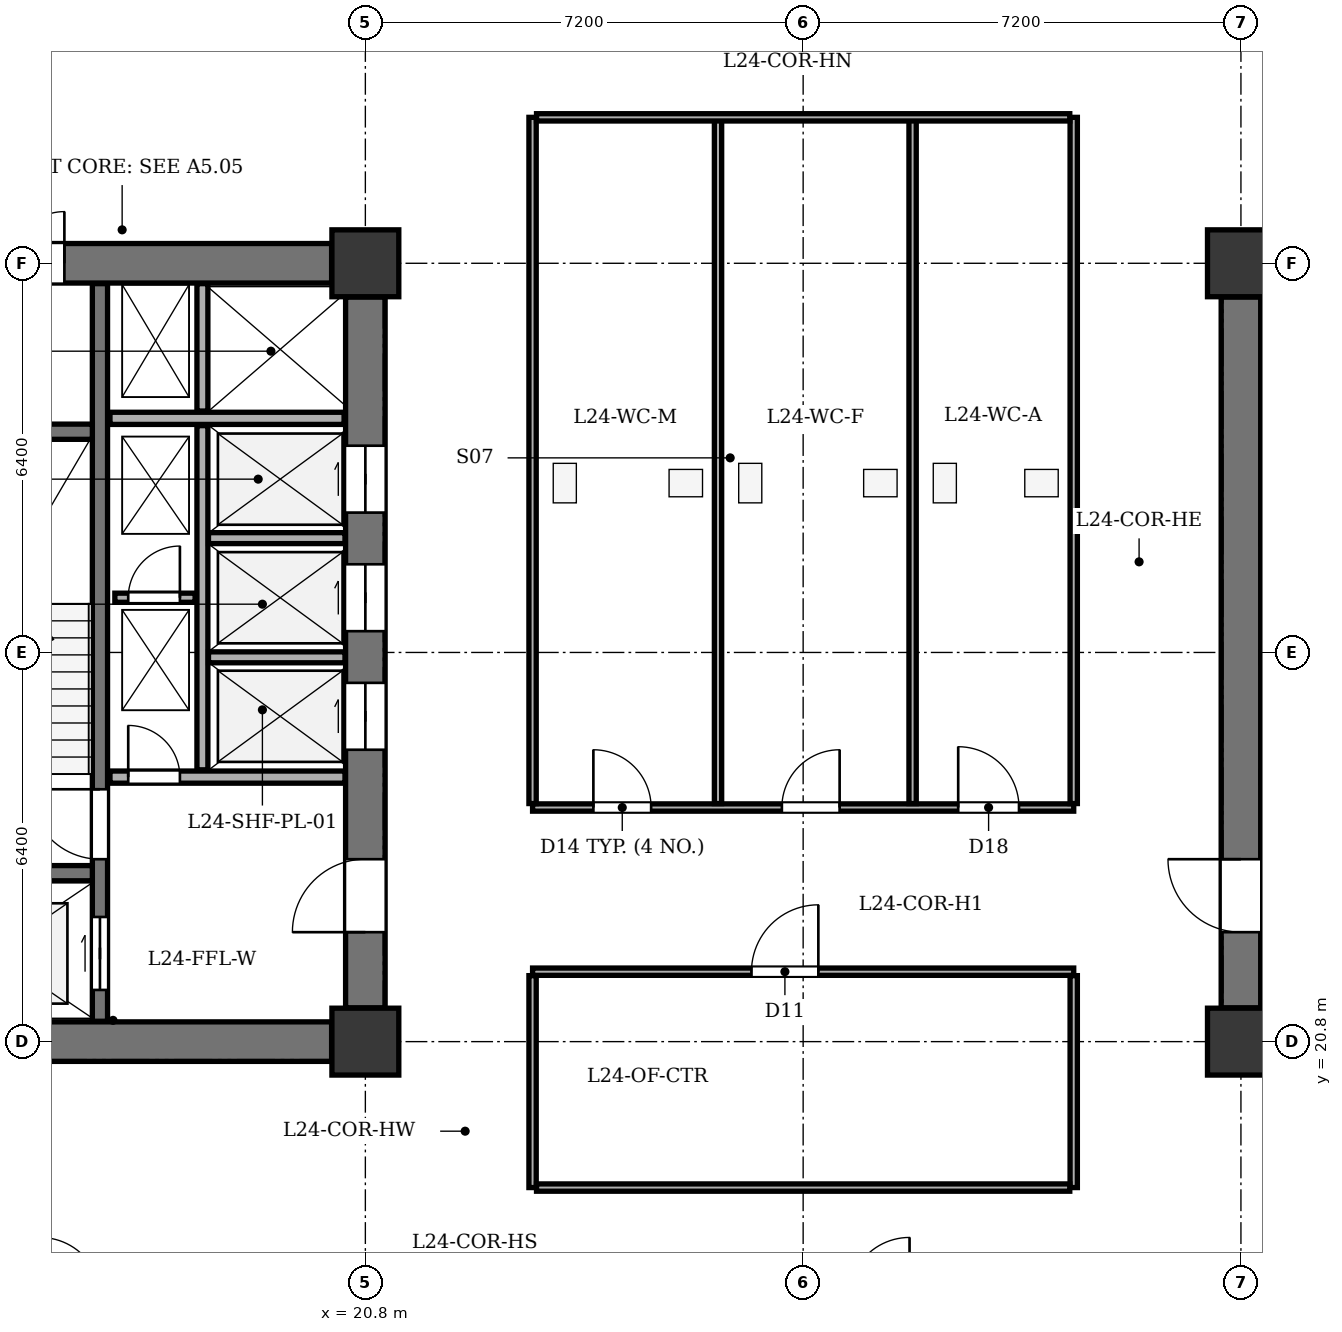
"""IFC4 building model, lengths in metres.
Left out: names, types, materials, properties, quantities, classifications, styles, units other than length and angle.
Written with IfcOpenShell. Run it as: python <this file> out.ifc"""

import sys

from ifc_helpers import new_model, si_unit, direction, frame, frame_2d, origin, origin_2d, place, context, subcontext, project, spatial, rectangle, extrude, element, fill, save


model = new_model("IFC4")
c1 = context("Model", 3, precision=1e-05, world=origin(), true_north=direction((0.0, 1.0)))
c2 = subcontext(c1, "Body", "Model", "MODEL_VIEW")
j1 = project(units=[si_unit("LENGTHUNIT", "METRE"), si_unit("PLANEANGLEUNIT", "RADIAN")], contexts=[c1])
p1 = place(None, origin())
s1 = spatial("IfcSite", under=j1, at=p1, CompositionType="ELEMENT")
p2 = place(p1, origin())
s2 = spatial("IfcBuilding", under=s1, at=p2, CompositionType="ELEMENT")
p3 = place(p2, frame((0.0, 0.0, 98.4)))
s3 = spatial("IfcBuildingStorey", under=s2, at=p3, CompositionType="ELEMENT", Elevation=98.4)
for number, where, z_axis, x_axis in (
    (1, (20.8, 20.8, 0.0), (0.0, 0.0, 1.0), (1.0, 0.0, 0.0)),
    (2, (20.8, 33.6, 0.0), (0.0, 0.0, 1.0), (1.0, 0.0, 0.0)),
    (3, (35.2, 20.8, 0.0), (0.0, 0.0, 1.0), (1.0, 0.0, 0.0)),
    (4, (35.2, 33.6, 0.0), (0.0, 0.0, 1.0), (1.0, 0.0, 0.0)),
):
    element("IfcColumn", number, at=place(p3, frame(where, z_axis=z_axis, x_axis=x_axis)), inside=s3, PredefinedType="COLUMN", context=c2, shape_type="SweptSolid", body=[
        extrude(rectangle(XDim=1.1, YDim=1.1, at=origin_2d()), origin(), (0.0, 0.0, 1.0), 3.9),
    ])
p4 = place(p3, frame((13.355, 20.8, 0.0), z_axis=(0.0, 0.0, 1.0), x_axis=(1.0, 0.0, 0.0)))
e5 = element("IfcWall", 5, at=p4, inside=s3, PredefinedType="SHEAR", context=c2, shape_type="SweptSolid", body=[
    extrude(rectangle(XDim=6.89, YDim=0.65, at=frame_2d((3.445, 0.0))), origin(), (0.0, 0.0, 1.0), 3.6),
])
p5 = place(p3, frame((13.355, 33.6, 0.0), z_axis=(0.0, 0.0, 1.0), x_axis=(1.0, 0.0, 0.0)))
e6 = element("IfcWall", 6, at=p5, inside=s3, PredefinedType="SHEAR", context=c2, shape_type="SweptSolid", body=[
    extrude(rectangle(XDim=6.89, YDim=0.65, at=frame_2d((3.445, 0.0))), origin(), (0.0, 0.0, 1.0), 3.6),
])
p6 = place(p5, frame((0.345, 0.0, 0.0)))
e7 = element("IfcOpeningElement", 7, at=p6, cuts=e6, PredefinedType="OPENING", context=c2, shape_type="SweptSolid", body=[
    extrude(rectangle(XDim=0.85, YDim=2.02, at=frame_2d((0.425, 1.01))), frame((0.0, 0.335, 0.0), z_axis=(0.0, -1.0, 0.0), x_axis=(1.0, 0.0, 0.0)), (0.0, 0.0, 1.0), 0.67),
])
p7 = place(p5, frame((1.645, 0.0, 0.0)))
e8 = element("IfcOpeningElement", 8, at=p7, cuts=e6, PredefinedType="OPENING", context=c2, shape_type="SweptSolid", body=[
    extrude(rectangle(XDim=0.85, YDim=2.02, at=frame_2d((0.425, 1.01))), frame((0.0, 0.335, 0.0), z_axis=(0.0, -1.0, 0.0), x_axis=(1.0, 0.0, 0.0)), (0.0, 0.0, 1.0), 0.67),
])
p8 = place(p3, frame((20.8, 21.355, 0.0), z_axis=(0.0, 0.0, 1.0), x_axis=(0.0, 1.0, 0.0)))
e9 = element("IfcWall", 9, at=p8, inside=s3, PredefinedType="SHEAR", context=c2, shape_type="SweptSolid", body=[
    extrude(rectangle(XDim=11.69, YDim=0.65, at=frame_2d((5.845, 0.0))), origin(), (0.0, 0.0, 1.0), 3.6),
])
p9 = place(p8, frame((1.245, 0.0, 0.0)))
e10 = element("IfcOpeningElement", 10, at=p9, cuts=e9, PredefinedType="OPENING", context=c2, shape_type="SweptSolid", body=[
    extrude(rectangle(XDim=1.2, YDim=2.15, at=frame_2d((0.6, 1.075))), frame((0.0, 0.335, 0.0), z_axis=(0.0, -1.0, 0.0), x_axis=(1.0, 0.0, 0.0)), (0.0, 0.0, 1.0), 0.67),
])
p10 = place(p8, frame((4.245, 0.0, 0.0)))
e11 = element("IfcOpeningElement", 11, at=p10, cuts=e9, PredefinedType="OPENING", context=c2, shape_type="SweptSolid", body=[
    extrude(rectangle(XDim=1.1, YDim=2.1, at=frame_2d((0.55, 1.05))), frame((0.0, 0.335, 0.0), z_axis=(0.0, -1.0, 0.0), x_axis=(1.0, 0.0, 0.0)), (0.0, 0.0, 1.0), 0.67),
])
p11 = place(p8, frame((6.195, 0.0, 0.0)))
e12 = element("IfcOpeningElement", 12, at=p11, cuts=e9, PredefinedType="OPENING", context=c2, shape_type="SweptSolid", body=[
    extrude(rectangle(XDim=1.1, YDim=2.1, at=frame_2d((0.55, 1.05))), frame((0.0, 0.335, 0.0), z_axis=(0.0, -1.0, 0.0), x_axis=(1.0, 0.0, 0.0)), (0.0, 0.0, 1.0), 0.67),
])
p12 = place(p8, frame((8.145, 0.0, 0.0)))
e13 = element("IfcOpeningElement", 13, at=p12, cuts=e9, PredefinedType="OPENING", context=c2, shape_type="SweptSolid", body=[
    extrude(rectangle(XDim=1.1, YDim=2.1, at=frame_2d((0.55, 1.05))), frame((0.0, 0.335, 0.0), z_axis=(0.0, -1.0, 0.0), x_axis=(1.0, 0.0, 0.0)), (0.0, 0.0, 1.0), 0.67),
])
p13 = place(p3, frame((16.435, 21.135, 0.0), z_axis=(0.0, 0.0, 1.0), x_axis=(0.0, 1.0, 0.0)))
e14 = element("IfcWall", 14, at=p13, inside=s3, PredefinedType="SHEAR", context=c2, shape_type="SweptSolid", body=[
    extrude(rectangle(XDim=12.13, YDim=0.25, at=frame_2d((6.065, 0.0))), origin(), (0.0, 0.0, 1.0), 3.6),
])
p14 = place(p13, frame((0.515, 0.0, 0.0)))
e15 = element("IfcOpeningElement", 15, at=p14, cuts=e14, PredefinedType="OPENING", context=c2, shape_type="SweptSolid", body=[
    extrude(rectangle(XDim=1.2, YDim=2.15, at=frame_2d((0.6, 1.075))), frame((0.0, 0.135, 0.0), z_axis=(0.0, -1.0, 0.0), x_axis=(1.0, 0.0, 0.0)), (0.0, 0.0, 1.0), 0.27),
])
p15 = place(p13, frame((2.665, 0.0, 0.0)))
e16 = element("IfcOpeningElement", 16, at=p15, cuts=e14, PredefinedType="OPENING", context=c2, shape_type="SweptSolid", body=[
    extrude(rectangle(XDim=1.15, YDim=2.15, at=frame_2d((0.575, 1.075))), frame((0.0, 0.135, 0.0), z_axis=(0.0, -1.0, 0.0), x_axis=(1.0, 0.0, 0.0)), (0.0, 0.0, 1.0), 0.27),
])
for number, where, z_axis, x_axis in (
    (17, (13.135, 23.57, 0.0), (0.0, 0.0, 1.0), (1.0, 0.0, 0.0)),
    (18, (13.135, 30.83, 0.0), (0.0, 0.0, 1.0), (1.0, 0.0, 0.0)),
):
    element("IfcWall", number, at=place(p3, frame(where, z_axis=z_axis, x_axis=x_axis)), inside=s3, PredefinedType="SHEAR", context=c2, shape_type="SweptSolid", body=[
        extrude(rectangle(XDim=3.175, YDim=0.25, at=frame_2d((1.587, 0.0))), origin(), (0.0, 0.0, 1.0), 3.6),
    ])
p16 = place(p3, frame((16.6, 25.15, 0.0), z_axis=(0.0, 0.0, 1.0), x_axis=(1.0, 0.0, 0.0)))
e19 = element("IfcWall", 19, at=p16, inside=s3, PredefinedType="SOLIDWALL", context=c2, shape_type="SweptSolid", body=[
    extrude(rectangle(XDim=3.865, YDim=0.2, at=frame_2d((1.933, 0.0))), origin(), (0.0, 0.0, 1.0), 3.6),
])
p17 = place(p16, frame((0.3, 0.0, 0.0)))
e20 = element("IfcOpeningElement", 20, at=p17, cuts=e19, PredefinedType="OPENING", context=c2, shape_type="SweptSolid", body=[
    extrude(rectangle(XDim=0.85, YDim=2.02, at=frame_2d((0.425, 1.01))), frame((0.0, 0.11, 0.0), z_axis=(0.0, -1.0, 0.0), x_axis=(1.0, 0.0, 0.0)), (0.0, 0.0, 1.0), 0.22),
])
p18 = place(p3, frame((16.6, 31.05, 0.0), z_axis=(0.0, 0.0, 1.0), x_axis=(1.0, 0.0, 0.0)))
e21 = element("IfcWall", 21, at=p18, inside=s3, PredefinedType="SOLIDWALL", context=c2, shape_type="SweptSolid", body=[
    extrude(rectangle(XDim=3.85, YDim=0.2, at=frame_2d((1.925, 0.0))), origin(), (0.0, 0.0, 1.0), 3.6),
])
p19 = place(p3, frame((18.12, 25.27, 0.0), z_axis=(0.0, 0.0, 1.0), x_axis=(0.0, 1.0, 0.0)))
e22 = element("IfcWall", 22, at=p19, inside=s3, PredefinedType="PARTITIONING", context=c2, shape_type="SweptSolid", body=[
    extrude(rectangle(XDim=5.66, YDim=0.18, at=frame_2d((2.83, 0.0))), origin(), (0.0, 0.0, 1.0), 3.6),
])
p20 = place(p3, frame((18.12, 31.17, 0.0), z_axis=(0.0, 0.0, 1.0), x_axis=(0.0, 1.0, 0.0)))
e23 = element("IfcWall", 23, at=p20, inside=s3, PredefinedType="PARTITIONING", context=c2, shape_type="SweptSolid", body=[
    extrude(rectangle(XDim=2.095, YDim=0.18, at=frame_2d((1.047, 0.0))), origin(), (0.0, 0.0, 1.0), 3.6),
])
for number, where, z_axis, x_axis in (
    (24, (18.22, 27.12, 0.0), (0.0, 0.0, 1.0), (1.0, 0.0, 0.0)),
    (25, (18.22, 29.08, 0.0), (0.0, 0.0, 1.0), (1.0, 0.0, 0.0)),
):
    element("IfcWall", number, at=place(p3, frame(where, z_axis=z_axis, x_axis=x_axis)), inside=s3, PredefinedType="PARTITIONING", context=c2, shape_type="SweptSolid", body=[
        extrude(rectangle(XDim=2.245, YDim=0.18, at=frame_2d((1.123, 0.0))), origin(), (0.0, 0.0, 1.0), 3.6),
    ])
p21 = place(p3, frame((35.2, 21.355, 0.0), z_axis=(0.0, 0.0, 1.0), x_axis=(0.0, 1.0, 0.0)))
e26 = element("IfcWall", 26, at=p21, inside=s3, PredefinedType="SHEAR", context=c2, shape_type="SweptSolid", body=[
    extrude(rectangle(XDim=11.69, YDim=0.65, at=frame_2d((5.845, 0.0))), origin(), (0.0, 0.0, 1.0), 3.6),
])
p22 = place(p21, frame((1.245, 0.0, 0.0)))
e27 = element("IfcOpeningElement", 27, at=p22, cuts=e26, PredefinedType="OPENING", context=c2, shape_type="SweptSolid", body=[
    extrude(rectangle(XDim=1.2, YDim=2.15, at=frame_2d((0.6, 1.075))), frame((0.0, 0.335, 0.0), z_axis=(0.0, -1.0, 0.0), x_axis=(1.0, 0.0, 0.0)), (0.0, 0.0, 1.0), 0.67),
])
p23 = place(p3, frame((35.535, 25.15, 0.0), z_axis=(0.0, 0.0, 1.0), x_axis=(1.0, 0.0, 0.0)))
e28 = element("IfcWall", 28, at=p23, inside=s3, PredefinedType="SOLIDWALL", context=c2, shape_type="SweptSolid", body=[
    extrude(rectangle(XDim=3.865, YDim=0.2, at=frame_2d((1.933, 0.0))), origin(), (0.0, 0.0, 1.0), 3.6),
])
for number, where, z_axis, x_axis in (
    (29, (35.535, 27.12, 0.0), (0.0, 0.0, 1.0), (1.0, 0.0, 0.0)),
    (30, (35.535, 29.08, 0.0), (0.0, 0.0, 1.0), (1.0, 0.0, 0.0)),
):
    element("IfcWall", number, at=place(p3, frame(where, z_axis=z_axis, x_axis=x_axis)), inside=s3, PredefinedType="PARTITIONING", context=c2, shape_type="SweptSolid", body=[
        extrude(rectangle(XDim=2.245, YDim=0.18, at=frame_2d((1.123, 0.0))), origin(), (0.0, 0.0, 1.0), 3.6),
    ])
p24 = place(p3, frame((16.68, 28.1, 0.0), z_axis=(0.0, 0.0, 1.0), x_axis=(1.0, 0.0, 0.0)))
e31 = element("IfcWall", 31, at=p24, inside=s3, PredefinedType="PARTITIONING", context=c2, shape_type="SweptSolid", body=[
    extrude(rectangle(XDim=1.32, YDim=0.15, at=frame_2d((0.66, 0.0))), origin(), (0.0, 0.0, 1.0), 3.6),
])
p25 = place(p24, frame((0.22, 0.0, 0.0)))
e32 = element("IfcOpeningElement", 32, at=p25, cuts=e31, PredefinedType="OPENING", context=c2, shape_type="SweptSolid", body=[
    extrude(rectangle(XDim=0.85, YDim=2.02, at=frame_2d((0.425, 1.01))), frame((0.0, 0.085, 0.0), z_axis=(0.0, -1.0, 0.0), x_axis=(1.0, 0.0, 0.0)), (0.0, 0.0, 1.0), 0.17),
])
p26 = place(p3, frame((23.55, 24.65, 0.0), z_axis=(0.0, 0.0, 1.0), x_axis=(1.0, 0.0, 0.0)))
e33 = element("IfcWall", 33, at=p26, inside=s3, PredefinedType="PARTITIONING", context=c2, shape_type="SweptSolid", body=[
    extrude(rectangle(XDim=8.9, YDim=0.12, at=frame_2d((4.45, 0.0))), origin(), (0.0, 0.0, 1.0), 3.135),
])
p27 = place(p26, frame((1.0, 0.0, 0.0)))
e34 = element("IfcOpeningElement", 34, at=p27, cuts=e33, PredefinedType="OPENING", context=c2, shape_type="SweptSolid", body=[
    extrude(rectangle(XDim=0.95, YDim=2.1, at=frame_2d((0.475, 1.05))), frame((0.0, 0.07, 0.0), z_axis=(0.0, -1.0, 0.0), x_axis=(1.0, 0.0, 0.0)), (0.0, 0.0, 1.0), 0.14),
])
p28 = place(p26, frame((4.1, 0.0, 0.0)))
e35 = element("IfcOpeningElement", 35, at=p28, cuts=e33, PredefinedType="OPENING", context=c2, shape_type="SweptSolid", body=[
    extrude(rectangle(XDim=0.95, YDim=2.1, at=frame_2d((0.475, 1.05))), frame((0.0, 0.07, 0.0), z_axis=(0.0, -1.0, 0.0), x_axis=(1.0, 0.0, 0.0)), (0.0, 0.0, 1.0), 0.14),
])
p29 = place(p26, frame((7.0, 0.0, 0.0)))
e36 = element("IfcOpeningElement", 36, at=p29, cuts=e33, PredefinedType="OPENING", context=c2, shape_type="SweptSolid", body=[
    extrude(rectangle(XDim=1.0, YDim=2.1, at=frame_2d((0.5, 1.05))), frame((0.0, 0.07, 0.0), z_axis=(0.0, -1.0, 0.0), x_axis=(1.0, 0.0, 0.0)), (0.0, 0.0, 1.0), 0.14),
])
for number, where, z_axis, x_axis in (
    (37, (23.55, 24.715, 0.0), (0.0, 0.0, 1.0), (0.0, 1.0, 0.0)),
    (38, (32.45, 24.715, 0.0), (0.0, 0.0, 1.0), (0.0, 1.0, 0.0)),
    (39, (26.6, 24.715, 0.0), (0.0, 0.0, 1.0), (0.0, 1.0, 0.0)),
):
    element("IfcWall", number, at=place(p3, frame(where, z_axis=z_axis, x_axis=x_axis)), inside=s3, PredefinedType="PARTITIONING", context=c2, shape_type="SweptSolid", body=[
        extrude(rectangle(XDim=11.285, YDim=0.12, at=frame_2d((5.643, 0.0))), origin(), (0.0, 0.0, 1.0), 3.6),
    ])
p30 = place(p3, frame((29.8, 24.715, 0.0), z_axis=(0.0, 0.0, 1.0), x_axis=(0.0, 1.0, 0.0)))
e40 = element("IfcWall", 40, at=p30, inside=s3, PredefinedType="PARTITIONING", context=c2, shape_type="SweptSolid", body=[
    extrude(rectangle(XDim=11.285, YDim=0.12, at=frame_2d((5.643, 0.0))), origin(), (0.0, 0.0, 1.0), 3.135),
])
p31 = place(p3, frame((23.615, 36.0, 0.0), z_axis=(0.0, 0.0, 1.0), x_axis=(1.0, 0.0, 0.0)))
e41 = element("IfcWall", 41, at=p31, inside=s3, PredefinedType="PARTITIONING", context=c2, shape_type="SweptSolid", body=[
    extrude(rectangle(XDim=8.77, YDim=0.12, at=frame_2d((4.385, 0.0))), origin(), (0.0, 0.0, 1.0), 3.6),
])
p32 = place(p3, frame((23.55, 21.95, 0.0), z_axis=(0.0, 0.0, 1.0), x_axis=(1.0, 0.0, 0.0)))
e42 = element("IfcWall", 42, at=p32, inside=s3, PredefinedType="PARTITIONING", context=c2, shape_type="SweptSolid", body=[
    extrude(rectangle(XDim=8.9, YDim=0.12, at=frame_2d((4.45, 0.0))), origin(), (0.0, 0.0, 1.0), 3.135),
])
p33 = place(p32, frame((3.6, 0.0, 0.0)))
e43 = element("IfcOpeningElement", 43, at=p33, cuts=e42, PredefinedType="OPENING", context=c2, shape_type="SweptSolid", body=[
    extrude(rectangle(XDim=1.1, YDim=2.15, at=frame_2d((0.55, 1.075))), frame((0.0, 0.07, 0.0), z_axis=(0.0, -1.0, 0.0), x_axis=(1.0, 0.0, 0.0)), (0.0, 0.0, 1.0), 0.14),
])
for number, where, z_axis, x_axis in (
    (44, (23.55, 18.4, 0.0), (0.0, 0.0, 1.0), (0.0, 1.0, 0.0)),
    (45, (32.45, 18.4, 0.0), (0.0, 0.0, 1.0), (0.0, 1.0, 0.0)),
):
    element("IfcWall", number, at=place(p3, frame(where, z_axis=z_axis, x_axis=x_axis)), inside=s3, PredefinedType="PARTITIONING", context=c2, shape_type="SweptSolid", body=[
        extrude(rectangle(XDim=3.485, YDim=0.12, at=frame_2d((1.743, 0.0))), origin(), (0.0, 0.0, 1.0), 3.6),
    ])
p34 = place(p3, frame((23.615, 18.4, 0.0), z_axis=(0.0, 0.0, 1.0), x_axis=(1.0, 0.0, 0.0)))
e46 = element("IfcWall", 46, at=p34, inside=s3, PredefinedType="PARTITIONING", context=c2, shape_type="SweptSolid", body=[
    extrude(rectangle(XDim=8.77, YDim=0.12, at=frame_2d((4.385, 0.0))), origin(), (0.0, 0.0, 1.0), 3.6),
])
p35 = place(p7, origin())
e47 = element("IfcDoor", 47, at=p35, inside=s3, OperationType="SINGLE_SWING_RIGHT", PredefinedType="DOOR", context=c2, shape_type="SweptSolid", body=[
    extrude(rectangle(XDim=0.85, YDim=2.02, at=frame_2d((0.425, 1.01))), frame((0.0, 0.025, 0.0), z_axis=(0.0, -1.0, 0.0), x_axis=(1.0, 0.0, 0.0)), (0.0, 0.0, 1.0), 0.05),
])
fill(e8, e47)
p36 = place(p9, origin())
e48 = element("IfcDoor", 48, at=p36, inside=s3, OperationType="SINGLE_SWING_LEFT", PredefinedType="DOOR", context=c2, shape_type="SweptSolid", body=[
    extrude(rectangle(XDim=1.2, YDim=2.15, at=frame_2d((0.6, 1.075))), frame((0.0, 0.025, 0.0), z_axis=(0.0, -1.0, 0.0), x_axis=(1.0, 0.0, 0.0)), (0.0, 0.0, 1.0), 0.05),
])
fill(e10, e48)
p37 = place(p10, origin())
e49 = element("IfcDoor", 49, at=p37, inside=s3, OperationType="DOUBLE_DOOR_SLIDING", PredefinedType="DOOR", context=c2, shape_type="SweptSolid", body=[
    extrude(rectangle(XDim=1.1, YDim=2.1, at=frame_2d((0.55, 1.05))), frame((0.0, 0.025, 0.0), z_axis=(0.0, -1.0, 0.0), x_axis=(1.0, 0.0, 0.0)), (0.0, 0.0, 1.0), 0.05),
])
fill(e11, e49)
p38 = place(p11, origin())
e50 = element("IfcDoor", 50, at=p38, inside=s3, OperationType="DOUBLE_DOOR_SLIDING", PredefinedType="DOOR", context=c2, shape_type="SweptSolid", body=[
    extrude(rectangle(XDim=1.1, YDim=2.1, at=frame_2d((0.55, 1.05))), frame((0.0, 0.025, 0.0), z_axis=(0.0, -1.0, 0.0), x_axis=(1.0, 0.0, 0.0)), (0.0, 0.0, 1.0), 0.05),
])
fill(e12, e50)
p39 = place(p12, origin())
e51 = element("IfcDoor", 51, at=p39, inside=s3, OperationType="DOUBLE_DOOR_SLIDING", PredefinedType="DOOR", context=c2, shape_type="SweptSolid", body=[
    extrude(rectangle(XDim=1.1, YDim=2.1, at=frame_2d((0.55, 1.05))), frame((0.0, 0.025, 0.0), z_axis=(0.0, -1.0, 0.0), x_axis=(1.0, 0.0, 0.0)), (0.0, 0.0, 1.0), 0.05),
])
fill(e13, e51)
p40 = place(p14, origin())
e52 = element("IfcDoor", 52, at=p40, inside=s3, OperationType="DOUBLE_DOOR_SLIDING", PredefinedType="DOOR", context=c2, shape_type="SweptSolid", body=[
    extrude(rectangle(XDim=1.2, YDim=2.15, at=frame_2d((0.6, 1.075))), frame((0.0, 0.025, 0.0), z_axis=(0.0, -1.0, 0.0), x_axis=(1.0, 0.0, 0.0)), (0.0, 0.0, 1.0), 0.05),
])
fill(e15, e52)
p41 = place(p15, origin())
e53 = element("IfcDoor", 53, at=p41, inside=s3, OperationType="SINGLE_SWING_RIGHT", PredefinedType="DOOR", context=c2, shape_type="SweptSolid", body=[
    extrude(rectangle(XDim=1.15, YDim=2.15, at=frame_2d((0.575, 1.075))), frame((0.0, 0.025, 0.0), z_axis=(0.0, -1.0, 0.0), x_axis=(1.0, 0.0, 0.0)), (0.0, 0.0, 1.0), 0.05),
])
fill(e16, e53)
p42 = place(p17, origin())
e54 = element("IfcDoor", 54, at=p42, inside=s3, OperationType="SINGLE_SWING_LEFT", PredefinedType="DOOR", context=c2, shape_type="SweptSolid", body=[
    extrude(rectangle(XDim=0.85, YDim=2.02, at=frame_2d((0.425, 1.01))), frame((0.0, 0.025, 0.0), z_axis=(0.0, -1.0, 0.0), x_axis=(1.0, 0.0, 0.0)), (0.0, 0.0, 1.0), 0.05),
])
fill(e20, e54)
p43 = place(p22, origin())
e55 = element("IfcDoor", 55, at=p43, inside=s3, OperationType="SINGLE_SWING_RIGHT", PredefinedType="DOOR", context=c2, shape_type="SweptSolid", body=[
    extrude(rectangle(XDim=1.2, YDim=2.15, at=frame_2d((0.6, 1.075))), frame((0.0, 0.025, 0.0), z_axis=(0.0, -1.0, 0.0), x_axis=(1.0, 0.0, 0.0)), (0.0, 0.0, 1.0), 0.05),
])
fill(e27, e55)
p44 = place(p25, origin())
e56 = element("IfcDoor", 56, at=p44, inside=s3, OperationType="SINGLE_SWING_RIGHT", PredefinedType="DOOR", context=c2, shape_type="SweptSolid", body=[
    extrude(rectangle(XDim=0.85, YDim=2.02, at=frame_2d((0.425, 1.01))), frame((0.0, 0.025, 0.0), z_axis=(0.0, -1.0, 0.0), x_axis=(1.0, 0.0, 0.0)), (0.0, 0.0, 1.0), 0.05),
])
fill(e32, e56)
p45 = place(p27, origin())
e57 = element("IfcDoor", 57, at=p45, inside=s3, OperationType="SINGLE_SWING_LEFT", PredefinedType="DOOR", context=c2, shape_type="SweptSolid", body=[
    extrude(rectangle(XDim=0.95, YDim=2.1, at=frame_2d((0.475, 1.05))), frame((0.0, 0.025, 0.0), z_axis=(0.0, -1.0, 0.0), x_axis=(1.0, 0.0, 0.0)), (0.0, 0.0, 1.0), 0.05),
])
fill(e34, e57)
p46 = place(p28, origin())
e58 = element("IfcDoor", 58, at=p46, inside=s3, OperationType="SINGLE_SWING_RIGHT", PredefinedType="DOOR", context=c2, shape_type="SweptSolid", body=[
    extrude(rectangle(XDim=0.95, YDim=2.1, at=frame_2d((0.475, 1.05))), frame((0.0, 0.025, 0.0), z_axis=(0.0, -1.0, 0.0), x_axis=(1.0, 0.0, 0.0)), (0.0, 0.0, 1.0), 0.05),
])
fill(e35, e58)
p47 = place(p29, origin())
e59 = element("IfcDoor", 59, at=p47, inside=s3, OperationType="SINGLE_SWING_LEFT", PredefinedType="DOOR", context=c2, shape_type="SweptSolid", body=[
    extrude(rectangle(XDim=1.0, YDim=2.1, at=frame_2d((0.5, 1.05))), frame((0.0, 0.025, 0.0), z_axis=(0.0, -1.0, 0.0), x_axis=(1.0, 0.0, 0.0)), (0.0, 0.0, 1.0), 0.05),
])
fill(e36, e59)
p48 = place(p33, origin())
e60 = element("IfcDoor", 60, at=p48, inside=s3, OperationType="SINGLE_SWING_RIGHT", PredefinedType="DOOR", context=c2, shape_type="SweptSolid", body=[
    extrude(rectangle(XDim=1.1, YDim=2.15, at=frame_2d((0.55, 1.075))), frame((0.0, 0.025, 0.0), z_axis=(0.0, -1.0, 0.0), x_axis=(1.0, 0.0, 0.0)), (0.0, 0.0, 1.0), 0.05),
])
fill(e43, e60)
save(model, sys.argv[1])
